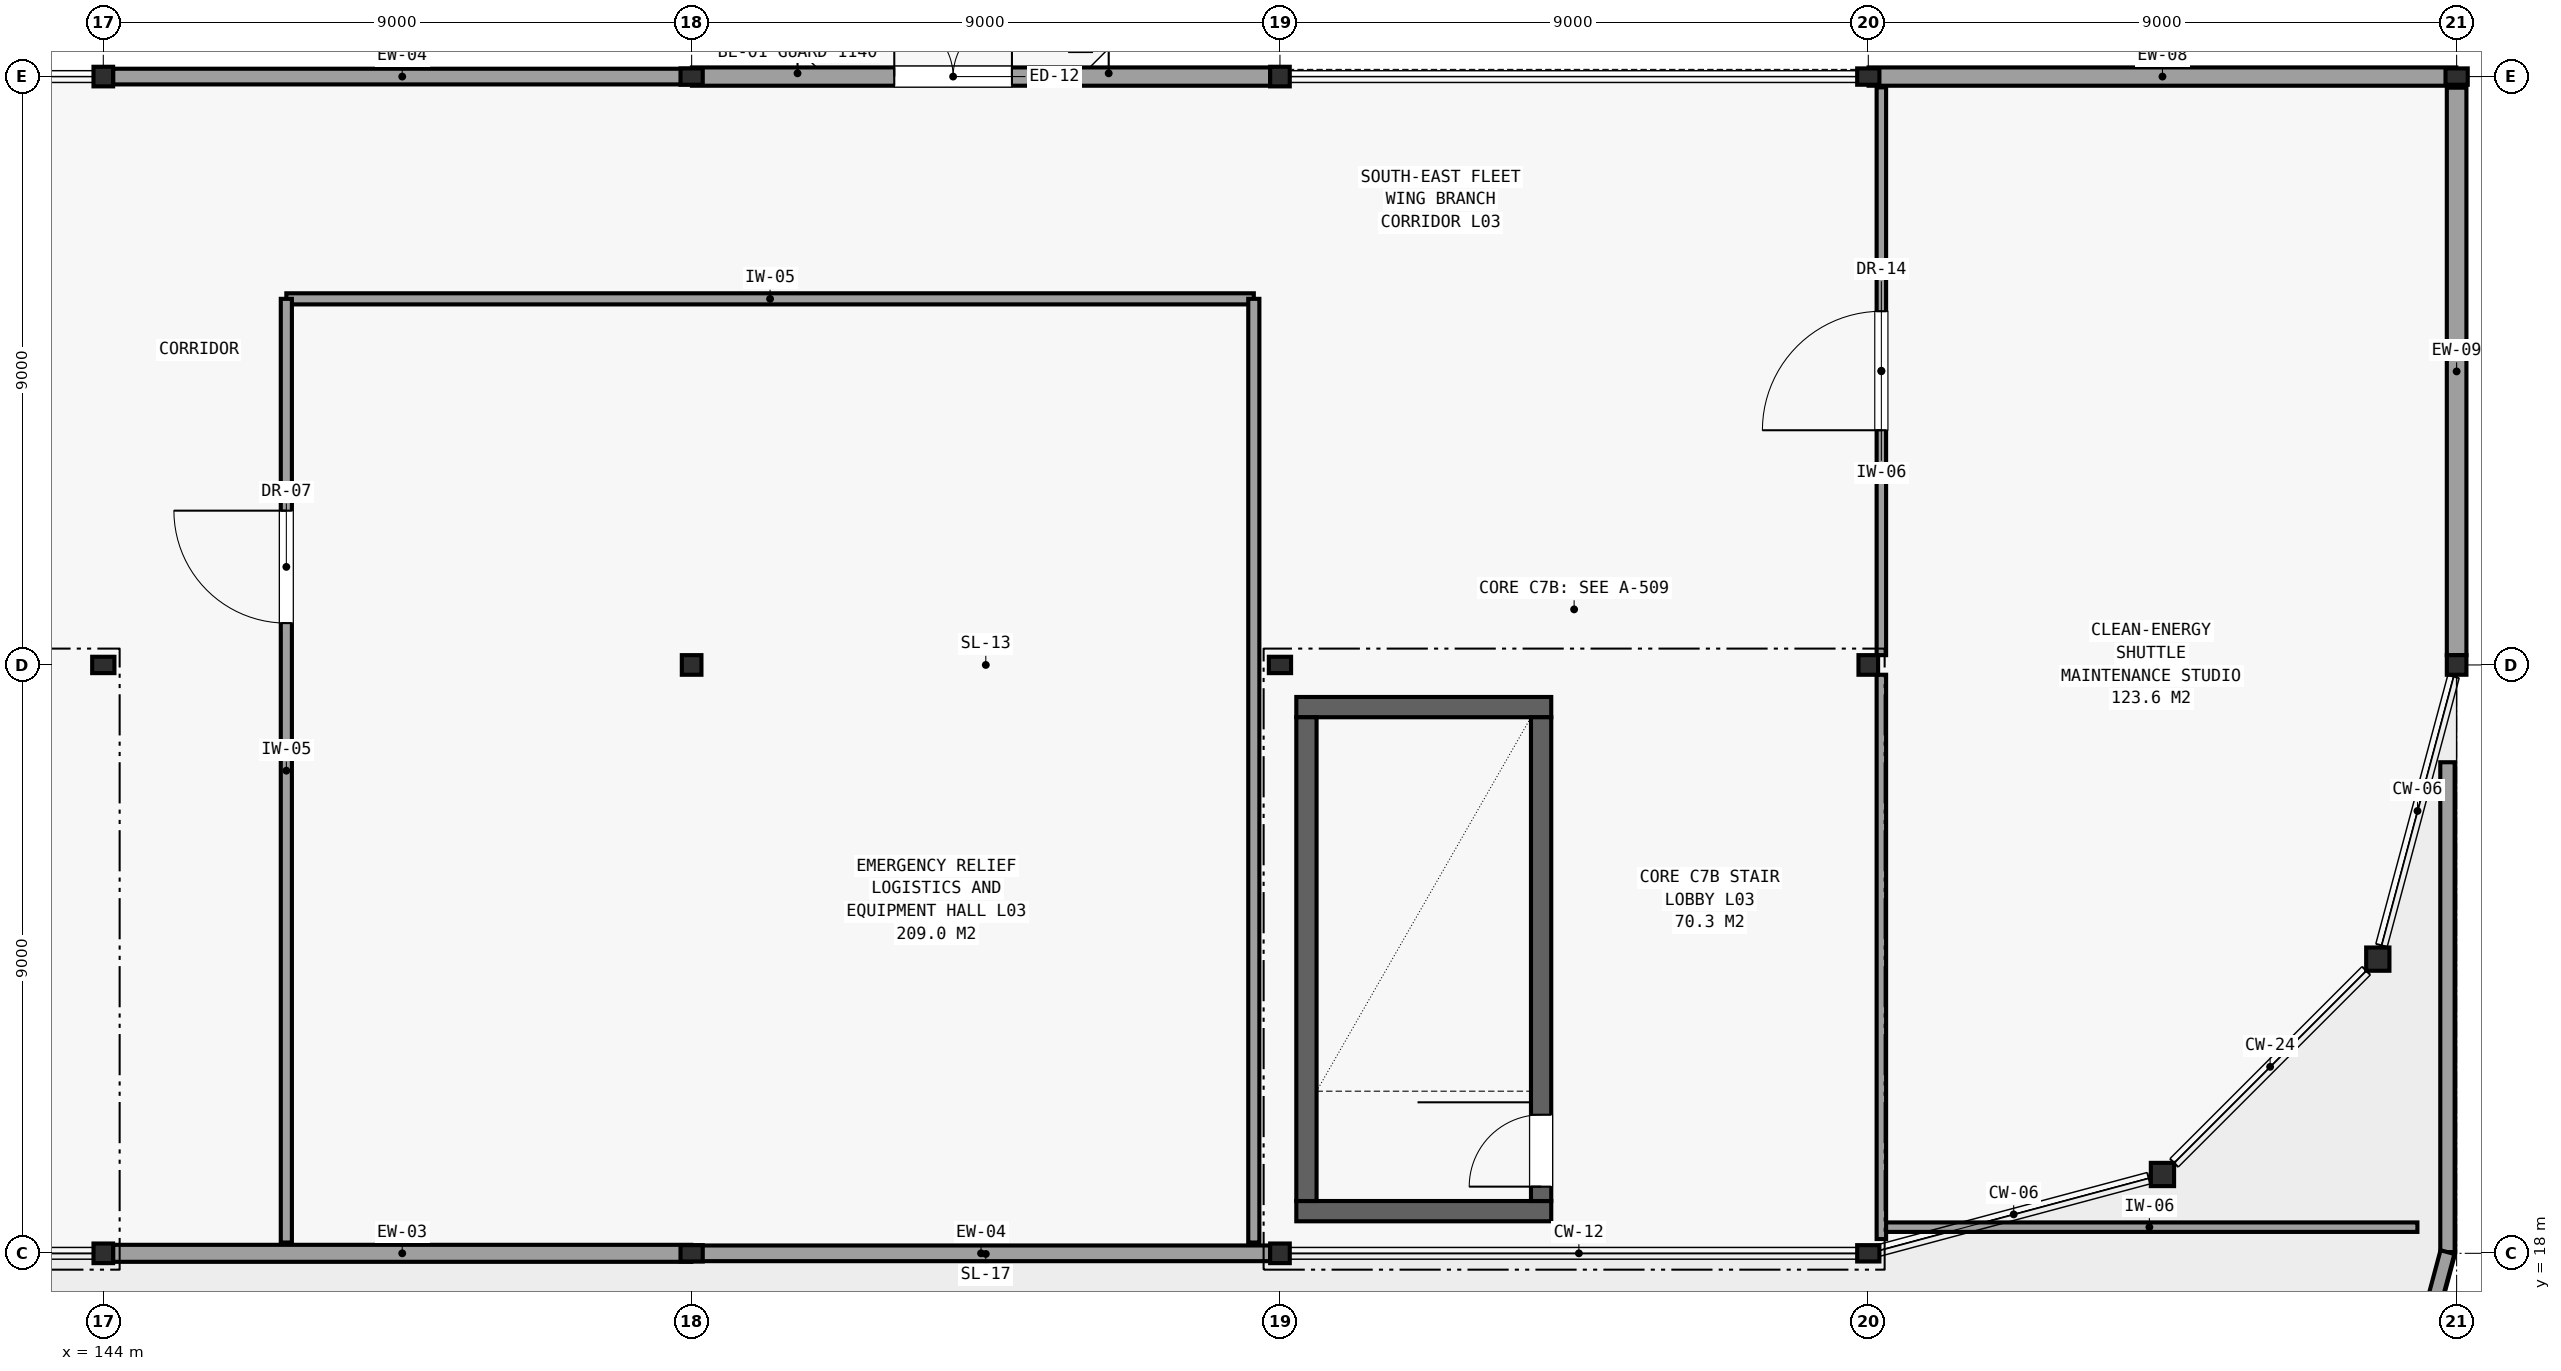
"""IFC4 building model, lengths in metres.
Left out: names, types, materials, properties, quantities, classifications, styles, units other than length and angle.
Written with IfcOpenShell. Run it as: python <this file> out.ifc"""

import sys

from ifc_helpers import new_model, si_unit, direction, frame, frame_2d, origin, origin_2d, place, context, subcontext, project, spatial, rectangle, hollow_rectangle, hollow_circle, i_section, extrude, element, fill, save


model = new_model("IFC4")
c1 = context("Model", 3, precision=1e-05, world=origin(), true_north=direction((0.0, 1.0)))
c2 = subcontext(c1, "Body", "Model", "MODEL_VIEW")
j1 = project(units=[si_unit("LENGTHUNIT", "METRE"), si_unit("PLANEANGLEUNIT", "RADIAN")], contexts=[c1])
p1 = place(None, origin())
s1 = spatial("IfcSite", under=j1, at=p1, CompositionType="ELEMENT")
p2 = place(p1, origin())
s2 = spatial("IfcBuilding", under=s1, at=p2, CompositionType="ELEMENT")
p3 = place(p2, frame((0.0, 0.0, 13.5)))
s3 = spatial("IfcBuildingStorey", under=s2, at=p3, CompositionType="ELEMENT", Elevation=13.5)
p4 = place(p3, frame((144.0, 18.0, 0.0), z_axis=(0.0, 0.0, 1.0), x_axis=(1.0, 0.0, 0.0)))
e1 = element("IfcColumn", 1, at=p4, inside=s3, PredefinedType="COLUMN", context=c2, shape_type="SweptSolid", body=[
    extrude(hollow_rectangle(XDim=0.3, YDim=0.3, WallThickness=0.012, at=origin_2d()), origin(), (0.0, 0.0, 1.0), 4.2),
])
p5 = place(p3, frame((144.0, 27.0, 0.0), z_axis=(0.0, 0.0, 1.0), x_axis=(1.0, 0.0, 0.0)))
e2 = element("IfcColumn", 2, at=p5, inside=s3, PredefinedType="COLUMN", context=c2, shape_type="SweptSolid", body=[
    extrude(i_section(OverallWidth=0.25, OverallDepth=0.34, WebThickness=0.009, FlangeThickness=0.014, FilletRadius=0.01, at=origin_2d()), origin(), (0.0, 0.0, 1.0), 4.2),
])
p6 = place(p3, frame((144.0, 36.0, 0.0), z_axis=(0.0, 0.0, 1.0), x_axis=(1.0, 0.0, 0.0)))
e3 = element("IfcColumn", 3, at=p6, inside=s3, PredefinedType="COLUMN", context=c2, shape_type="SweptSolid", body=[
    extrude(hollow_rectangle(XDim=0.3, YDim=0.3, WallThickness=0.012, at=origin_2d()), origin(), (0.0, 0.0, 1.0), 4.14),
])
p7 = place(p3, frame((153.0, 18.0, 0.0), z_axis=(0.0, 0.0, 1.0), x_axis=(1.0, 0.0, 0.0)))
e4 = element("IfcColumn", 4, at=p7, inside=s3, PredefinedType="COLUMN", context=c2, shape_type="SweptSolid", body=[
    extrude(i_section(OverallWidth=0.25, OverallDepth=0.34, WebThickness=0.009, FlangeThickness=0.014, FilletRadius=0.01, at=origin_2d()), origin(), (0.0, 0.0, 1.0), 4.14),
])
p8 = place(p3, frame((153.0, 27.0, 0.0), z_axis=(0.0, 0.0, 1.0), x_axis=(1.0, 0.0, 0.0)))
e5 = element("IfcColumn", 5, at=p8, inside=s3, PredefinedType="COLUMN", context=c2, shape_type="SweptSolid", body=[
    extrude(hollow_rectangle(XDim=0.3, YDim=0.3, WallThickness=0.012, at=origin_2d()), origin(), (0.0, 0.0, 1.0), 4.14),
])
p9 = place(p3, frame((153.0, 36.0, 0.0), z_axis=(0.0, 0.0, 1.0), x_axis=(1.0, 0.0, 0.0)))
e6 = element("IfcColumn", 6, at=p9, inside=s3, PredefinedType="COLUMN", context=c2, shape_type="SweptSolid", body=[
    extrude(i_section(OverallWidth=0.25, OverallDepth=0.34, WebThickness=0.009, FlangeThickness=0.014, FilletRadius=0.01, at=origin_2d()), origin(), (0.0, 0.0, 1.0), 4.14),
])
p10 = place(p3, frame((162.0, 18.0, 0.0), z_axis=(0.0, 0.0, 1.0), x_axis=(1.0, 0.0, 0.0)))
e7 = element("IfcColumn", 7, at=p10, inside=s3, PredefinedType="COLUMN", context=c2, shape_type="SweptSolid", body=[
    extrude(hollow_rectangle(XDim=0.3, YDim=0.3, WallThickness=0.012, at=origin_2d()), origin(), (0.0, 0.0, 1.0), 4.14),
])
p11 = place(p3, frame((162.0, 27.0, 0.0), z_axis=(0.0, 0.0, 1.0), x_axis=(1.0, 0.0, 0.0)))
e8 = element("IfcColumn", 8, at=p11, inside=s3, PredefinedType="COLUMN", context=c2, shape_type="SweptSolid", body=[
    extrude(i_section(OverallWidth=0.25, OverallDepth=0.34, WebThickness=0.009, FlangeThickness=0.014, FilletRadius=0.01, at=origin_2d()), origin(), (0.0, 0.0, 1.0), 4.14),
])
p12 = place(p3, frame((162.0, 36.0, 0.0), z_axis=(0.0, 0.0, 1.0), x_axis=(1.0, 0.0, 0.0)))
e9 = element("IfcColumn", 9, at=p12, inside=s3, PredefinedType="COLUMN", context=c2, shape_type="SweptSolid", body=[
    extrude(hollow_rectangle(XDim=0.3, YDim=0.3, WallThickness=0.012, at=origin_2d()), origin(), (0.0, 0.0, 1.0), 4.14),
])
p13 = place(p3, frame((171.0, 18.0, 0.0), z_axis=(0.0, 0.0, 1.0), x_axis=(1.0, 0.0, 0.0)))
e10 = element("IfcColumn", 10, at=p13, inside=s3, PredefinedType="COLUMN", context=c2, shape_type="SweptSolid", body=[
    extrude(i_section(OverallWidth=0.25, OverallDepth=0.34, WebThickness=0.009, FlangeThickness=0.014, FilletRadius=0.01, at=origin_2d()), origin(), (0.0, 0.0, 1.0), 4.14),
])
p14 = place(p3, frame((171.0, 27.0, 0.0), z_axis=(0.0, 0.0, 1.0), x_axis=(1.0, 0.0, 0.0)))
e11 = element("IfcColumn", 11, at=p14, inside=s3, PredefinedType="COLUMN", context=c2, shape_type="SweptSolid", body=[
    extrude(hollow_rectangle(XDim=0.3, YDim=0.3, WallThickness=0.012, at=origin_2d()), origin(), (0.0, 0.0, 1.0), 4.14),
])
p15 = place(p3, frame((171.0, 36.0, 0.0), z_axis=(0.0, 0.0, 1.0), x_axis=(1.0, 0.0, 0.0)))
e12 = element("IfcColumn", 12, at=p15, inside=s3, PredefinedType="COLUMN", context=c2, shape_type="SweptSolid", body=[
    extrude(i_section(OverallWidth=0.25, OverallDepth=0.34, WebThickness=0.009, FlangeThickness=0.014, FilletRadius=0.01, at=origin_2d()), origin(), (0.0, 0.0, 1.0), 4.14),
])
for number, where, z_axis, x_axis in (
    (13, (175.5, 19.206, 0.0), (0.0, 0.0, 1.0), (1.0, 0.0, 0.0)),
    (14, (178.794, 22.5, 0.0), (0.0, 0.0, 1.0), (1.0, 0.0, 0.0)),
):
    element("IfcColumn", number, at=place(p3, frame(where, z_axis=z_axis, x_axis=x_axis)), inside=s3, PredefinedType="COLUMN", context=c2, shape_type="SweptSolid", body=[
        extrude(hollow_circle(Radius=0.178, WallThickness=0.013, at=origin_2d()), origin(), (0.0, 0.0, 1.0), 4.14),
    ])
p16 = place(p3, frame((180.0, 27.0, 0.0), z_axis=(0.0, 0.0, 1.0), x_axis=(1.0, 0.0, 0.0)))
e15 = element("IfcColumn", 15, at=p16, inside=s3, PredefinedType="COLUMN", context=c2, shape_type="SweptSolid", body=[
    extrude(hollow_rectangle(XDim=0.3, YDim=0.3, WallThickness=0.012, at=origin_2d()), origin(), (0.0, 0.0, 1.0), 4.14),
])
p17 = place(p3, frame((180.0, 36.0, 0.0), z_axis=(0.0, 0.0, 1.0), x_axis=(1.0, 0.0, 0.0)))
e16 = element("IfcColumn", 16, at=p17, inside=s3, PredefinedType="COLUMN", context=c2, shape_type="SweptSolid", body=[
    extrude(i_section(OverallWidth=0.25, OverallDepth=0.34, WebThickness=0.009, FlangeThickness=0.014, FilletRadius=0.01, at=origin_2d()), origin(), (0.0, 0.0, 1.0), 4.14),
])
p18 = place(p3, frame((144.15, 18.0, 0.0), z_axis=(0.0, 0.0, 1.0), x_axis=(1.0, 0.0, 0.0)))
e17 = element("IfcWall", 17, at=p18, inside=s3, PredefinedType="SOLIDWALL", context=c2, shape_type="SweptSolid", body=[
    extrude(rectangle(XDim=8.846, YDim=0.26, at=frame_2d((4.423, 0.0))), origin(), (0.0, 0.0, 1.0), 3.29),
])
p19 = place(p3, frame((153.004, 18.0, 0.0), z_axis=(0.0, 0.0, 1.0), x_axis=(1.0, 0.0, 0.0)))
e18 = element("IfcWall", 18, at=p19, inside=s3, PredefinedType="SOLIDWALL", context=c2, shape_type="SweptSolid", body=[
    extrude(rectangle(XDim=8.846, YDim=0.24, at=frame_2d((4.423, 0.0))), origin(), (0.0, 0.0, 1.0), 3.29),
])
p20 = place(p3, frame((180.0, 27.15, 0.0), z_axis=(0.0, 0.0, 1.0), x_axis=(0.0, 1.0, 0.0)))
e19 = element("IfcWall", 19, at=p20, inside=s3, PredefinedType="SOLIDWALL", context=c2, shape_type="SweptSolid", body=[
    extrude(rectangle(XDim=8.68, YDim=0.3, at=frame_2d((4.34, 0.0))), origin(), (0.0, 0.0, 1.0), 3.29),
])
p21 = place(p3, frame((179.996, 36.0, 0.0), z_axis=(0.0, 0.0, 1.0), x_axis=(-1.0, 0.0, 0.0)))
e20 = element("IfcWall", 20, at=p21, inside=s3, PredefinedType="SOLIDWALL", context=c2, shape_type="SweptSolid", body=[
    extrude(rectangle(XDim=8.991, YDim=0.28, at=frame_2d((4.496, 0.0))), origin(), (0.0, 0.0, 1.0), 3.29),
])
p22 = place(p3, frame((161.85, 36.0, 0.0), z_axis=(0.0, 0.0, 1.0), x_axis=(-1.0, 0.0, 0.0)))
e21 = element("IfcWall", 21, at=p22, inside=s3, PredefinedType="SOLIDWALL", context=c2, shape_type="SweptSolid", body=[
    extrude(rectangle(XDim=8.846, YDim=0.28, at=frame_2d((4.423, 0.0))), origin(), (0.0, 0.0, 1.0), 3.29),
])
p23 = place(p22, frame((5.75, 0.0, 0.0), z_axis=(0.0, 0.0, 1.0), x_axis=(-1.0, 0.0, 0.0)))
e22 = element("IfcOpeningElement", 22, at=p23, cuts=e21, PredefinedType="OPENING", context=c2, shape_type="SweptSolid", body=[
    extrude(rectangle(XDim=1.8, YDim=2.2, at=frame_2d((0.9, 1.1))), frame((0.0, 0.151, 0.0), z_axis=(0.0, -1.0, 0.0), x_axis=(1.0, 0.0, 0.0)), (0.0, 0.0, 1.0), 0.302),
])
p24 = place(p3, frame((152.996, 36.0, 0.0), z_axis=(0.0, 0.0, 1.0), x_axis=(-1.0, 0.0, 0.0)))
e23 = element("IfcWall", 23, at=p24, inside=s3, PredefinedType="SOLIDWALL", context=c2, shape_type="SweptSolid", body=[
    extrude(rectangle(XDim=8.846, YDim=0.24, at=frame_2d((4.423, 0.0))), origin(), (0.0, 0.0, 1.0), 3.29),
])
p25 = place(p3, frame((179.86, 25.512, 0.0), z_axis=(0.0, 0.0, 1.0), x_axis=(0.0, -1.0, 0.0)))
e24 = element("IfcWall", 24, at=p25, inside=s3, PredefinedType="PARAPET", context=c2, shape_type="SweptSolid", body=[
    extrude(rectangle(XDim=7.493, YDim=0.22, at=frame_2d((3.747, 0.0))), origin(), (0.0, 0.0, 1.0), 0.52),
])
p26 = place(p3, frame((179.86, 18.018, 0.0), z_axis=(0.0, 0.0, 1.0), x_axis=(-0.258850976204, -0.965917269811, 0.0)))
e25 = element("IfcWall", 25, at=p26, inside=s3, PredefinedType="PARAPET", context=c2, shape_type="SweptSolid", body=[
    extrude(rectangle(XDim=4.603, YDim=0.22, at=frame_2d((2.301, 0.0))), origin(), (0.0, 0.0, 1.0), 0.52),
])
for number, where, z_axis, x_axis in (
    (26, (162.25, 18.645, 0.0), (0.0, 0.0, 1.0), (1.0, 0.0, 0.0)),
    (27, (162.25, 26.355, 0.0), (0.0, 0.0, 1.0), (1.0, 0.0, 0.0)),
):
    element("IfcWall", number, at=place(p3, frame(where, z_axis=z_axis, x_axis=x_axis)), inside=s3, PredefinedType="SHEAR", context=c2, shape_type="SweptSolid", body=[
        extrude(rectangle(XDim=3.9, YDim=0.31, at=frame_2d((1.95, 0.0))), origin(), (0.0, 0.0, 1.0), 3.94),
    ])
p27 = place(p3, frame((162.405, 18.8, 0.0), z_axis=(0.0, 0.0, 1.0), x_axis=(0.0, 1.0, 0.0)))
e28 = element("IfcWall", 28, at=p27, inside=s3, PredefinedType="SHEAR", context=c2, shape_type="SweptSolid", body=[
    extrude(rectangle(XDim=7.4, YDim=0.31, at=frame_2d((3.7, 0.0))), origin(), (0.0, 0.0, 1.0), 3.94),
])
p28 = place(p3, frame((165.995, 18.8, 0.0), z_axis=(0.0, 0.0, 1.0), x_axis=(0.0, 1.0, 0.0)))
e29 = element("IfcWall", 29, at=p28, inside=s3, PredefinedType="SHEAR", context=c2, shape_type="SweptSolid", body=[
    extrude(rectangle(XDim=7.4, YDim=0.31, at=frame_2d((3.7, 0.0))), origin(), (0.0, 0.0, 1.0), 3.94),
])
p29 = place(p28, frame((0.22, 0.0, 0.0)))
e30 = element("IfcOpeningElement", 30, at=p29, cuts=e29, PredefinedType="OPENING", context=c2, shape_type="SweptSolid", body=[
    extrude(rectangle(XDim=1.1, YDim=2.15, at=frame_2d((0.55, 1.075))), frame((0.0, 0.166, 0.0), z_axis=(0.0, -1.0, 0.0), x_axis=(1.0, 0.0, 0.0)), (0.0, 0.0, 1.0), 0.332),
])
p30 = place(p3, frame((146.8, 32.6, 0.0), z_axis=(0.0, 0.0, 1.0), x_axis=(1.0, 0.0, 0.0)))
e31 = element("IfcWall", 31, at=p30, inside=s3, PredefinedType="PARTITIONING", context=c2, shape_type="SweptSolid", body=[
    extrude(rectangle(XDim=14.8, YDim=0.17, at=frame_2d((7.4, 0.0))), origin(), (0.0, 0.0, 1.0), 3.29),
])
p31 = place(p3, frame((146.8, 18.165, 0.0), z_axis=(0.0, 0.0, 1.0), x_axis=(0.0, 1.0, 0.0)))
e32 = element("IfcWall", 32, at=p31, inside=s3, PredefinedType="PARTITIONING", context=c2, shape_type="SweptSolid", body=[
    extrude(rectangle(XDim=14.435, YDim=0.17, at=frame_2d((7.218, 0.0))), origin(), (0.0, 0.0, 1.0), 3.34),
])
p32 = place(p31, frame((9.475, 0.0, 0.0)))
e33 = element("IfcOpeningElement", 33, at=p32, cuts=e32, PredefinedType="OPENING", context=c2, shape_type="SweptSolid", body=[
    extrude(rectangle(XDim=1.72, YDim=2.4, at=frame_2d((0.86, 1.2))), frame((0.0, 0.096, 0.0), z_axis=(0.0, -1.0, 0.0), x_axis=(1.0, 0.0, 0.0)), (0.0, 0.0, 1.0), 0.192),
])
p33 = place(p3, frame((161.6, 18.165, 0.0), z_axis=(0.0, 0.0, 1.0), x_axis=(0.0, 1.0, 0.0)))
e34 = element("IfcWall", 34, at=p33, inside=s3, PredefinedType="PARTITIONING", context=c2, shape_type="SweptSolid", body=[
    extrude(rectangle(XDim=14.435, YDim=0.17, at=frame_2d((7.218, 0.0))), origin(), (0.0, 0.0, 1.0), 3.34),
])
p34 = place(p3, frame((171.2, 18.4, 0.0), z_axis=(0.0, 0.0, 1.0), x_axis=(1.0, 0.0, 0.0)))
e35 = element("IfcWall", 35, at=p34, inside=s3, PredefinedType="PARTITIONING", context=c2, shape_type="SweptSolid", body=[
    extrude(rectangle(XDim=8.2, YDim=0.145, at=frame_2d((4.1, 0.0))), origin(), (0.0, 0.0, 1.0), 3.29),
])
p35 = place(p3, frame((171.2, 18.219, 0.0), z_axis=(0.0, 0.0, 1.0), x_axis=(0.0, 1.0, 0.0)))
e36 = element("IfcWall", 36, at=p35, inside=s3, PredefinedType="PARTITIONING", context=c2, shape_type="SweptSolid", body=[
    extrude(rectangle(XDim=8.632, YDim=0.145, at=frame_2d((4.316, 0.0))), origin(), (0.0, 0.0, 1.0), 3.29),
])
p36 = place(p3, frame((171.2, 27.15, 0.0), z_axis=(0.0, 0.0, 1.0), x_axis=(0.0, 1.0, 0.0)))
e37 = element("IfcWall", 37, at=p36, inside=s3, PredefinedType="PARTITIONING", context=c2, shape_type="SweptSolid", body=[
    extrude(rectangle(XDim=8.685, YDim=0.145, at=frame_2d((4.343, 0.0))), origin(), (0.0, 0.0, 1.0), 3.29),
])
p37 = place(p36, frame((3.44, 0.0, 0.0)))
e38 = element("IfcOpeningElement", 38, at=p37, cuts=e37, PredefinedType="OPENING", context=c2, shape_type="SweptSolid", body=[
    extrude(rectangle(XDim=1.82, YDim=2.45, at=frame_2d((0.91, 1.225))), frame((0.0, 0.083, 0.0), z_axis=(0.0, -1.0, 0.0), x_axis=(1.0, 0.0, 0.0)), (0.0, 0.0, 1.0), 0.167),
])
p38 = place(p23, origin())
e39 = element("IfcDoor", 39, at=p38, inside=s3, OperationType="SINGLE_SWING_LEFT", PredefinedType="DOOR", context=c2, shape_type="SweptSolid", body=[
    extrude(rectangle(XDim=1.8, YDim=2.2, at=frame_2d((0.9, 1.1))), frame((0.0, 0.025, 0.0), z_axis=(0.0, -1.0, 0.0), x_axis=(1.0, 0.0, 0.0)), (0.0, 0.0, 1.0), 0.05),
])
fill(e22, e39)
p39 = place(p29, origin())
e40 = element("IfcDoor", 40, at=p39, inside=s3, OperationType="SINGLE_SWING_LEFT", PredefinedType="DOOR", context=c2, shape_type="SweptSolid", body=[
    extrude(rectangle(XDim=1.1, YDim=2.15, at=frame_2d((0.55, 1.075))), frame((0.0, 0.025, 0.0), z_axis=(0.0, -1.0, 0.0), x_axis=(1.0, 0.0, 0.0)), (0.0, 0.0, 1.0), 0.05),
])
fill(e30, e40)
p40 = place(p32, origin())
e41 = element("IfcDoor", 41, at=p40, inside=s3, OperationType="SINGLE_SWING_RIGHT", PredefinedType="DOOR", context=c2, shape_type="SweptSolid", body=[
    extrude(rectangle(XDim=1.72, YDim=2.4, at=frame_2d((0.86, 1.2))), frame((0.0, 0.025, 0.0), z_axis=(0.0, -1.0, 0.0), x_axis=(1.0, 0.0, 0.0)), (0.0, 0.0, 1.0), 0.05),
])
fill(e33, e41)
p41 = place(p37, origin())
e42 = element("IfcDoor", 42, at=p41, inside=s3, OperationType="SINGLE_SWING_LEFT", PredefinedType="DOOR", context=c2, shape_type="SweptSolid", body=[
    extrude(rectangle(XDim=1.82, YDim=2.45, at=frame_2d((0.91, 1.225))), frame((0.0, 0.025, 0.0), z_axis=(0.0, -1.0, 0.0), x_axis=(1.0, 0.0, 0.0)), (0.0, 0.0, 1.0), 0.05),
])
fill(e38, e42)
save(model, sys.argv[1])
